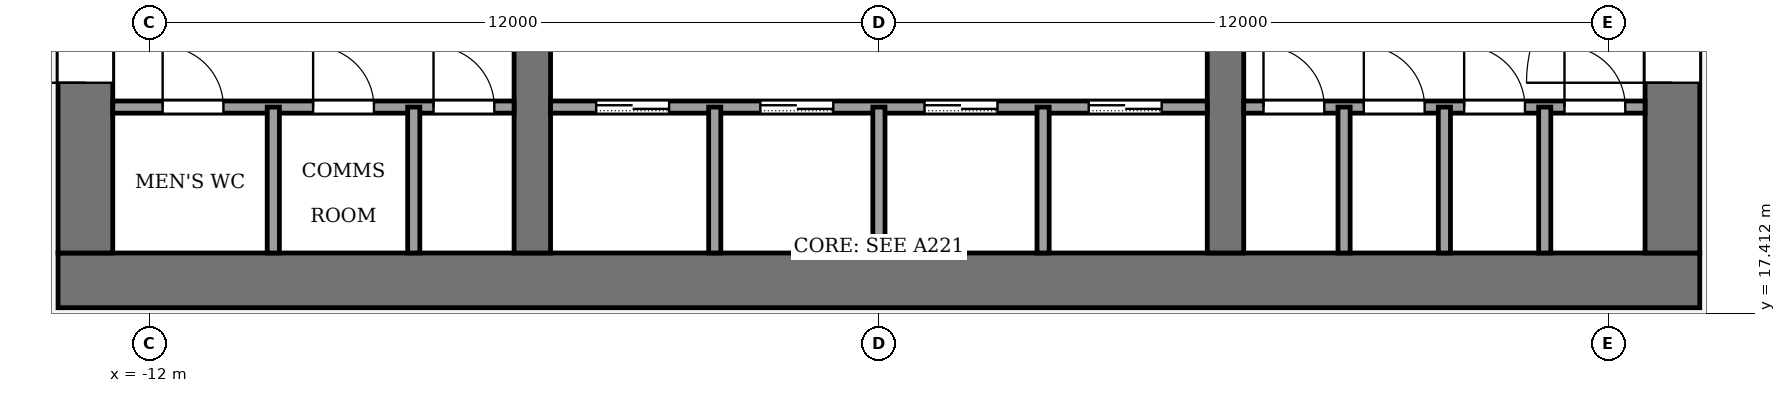
"""IFC4 building model, lengths in metres.
Left out: names, types, materials, properties, quantities, classifications, styles, units other than length and angle.
Written with IfcOpenShell. Run it as: python <this file> out.ifc"""

import sys

from ifc_helpers import new_model, si_unit, direction, frame, frame_2d, origin, place, context, subcontext, project, spatial, rectangle, extrude, element, fill, save


model = new_model("IFC4")
c1 = context("Model", 3, precision=1e-05, world=origin(), true_north=direction((0.0, 1.0)))
c2 = subcontext(c1, "Body", "Model", "MODEL_VIEW")
j1 = project(units=[si_unit("LENGTHUNIT", "METRE"), si_unit("PLANEANGLEUNIT", "RADIAN")], contexts=[c1])
p1 = place(None, origin())
s1 = spatial("IfcSite", under=j1, at=p1, CompositionType="ELEMENT")
p2 = place(p1, origin())
s2 = spatial("IfcBuilding", under=s1, at=p2, CompositionType="ELEMENT")
p3 = place(p2, frame((0.0, 0.0, 198.0)))
s3 = spatial("IfcBuildingStorey", under=s2, at=p3, CompositionType="ELEMENT", Elevation=198.0)
p4 = place(p3, frame((-13.5, 17.95, -0.13), z_axis=(0.0, 0.0, 1.0), x_axis=(1.0, 0.0, 0.0)))
e1 = element("IfcWall", 1, at=p4, inside=s3, PredefinedType="SHEAR", context=c2, shape_type="SweptSolid", body=[
    extrude(rectangle(XDim=27.0, YDim=0.9, at=frame_2d((13.5, 0.0))), origin(), (0.0, 0.0, 1.0), 4.0),
])
p5 = place(p3, frame((-13.05, 18.4, -0.13), z_axis=(0.0, 0.0, 1.0), x_axis=(0.0, 1.0, 0.0)))
e2 = element("IfcWall", 2, at=p5, inside=s3, PredefinedType="SHEAR", context=c2, shape_type="SweptSolid", body=[
    extrude(rectangle(XDim=19.2, YDim=0.9, at=frame_2d((9.6, 0.0))), origin(), (0.0, 0.0, 1.0), 4.0),
])
p6 = place(p5, frame((2.8, 0.0, 0.13)))
e3 = element("IfcOpeningElement", 3, at=p6, cuts=e2, PredefinedType="OPENING", context=c2, shape_type="SweptSolid", body=[
    extrude(rectangle(XDim=2.4, YDim=2.4, at=frame_2d((1.2, 1.2))), frame((0.0, 0.46, 0.0), z_axis=(0.0, -1.0, 0.0), x_axis=(1.0, 0.0, 0.0)), (0.0, 0.0, 1.0), 0.92),
])
p7 = place(p5, frame((13.4, 0.0, 0.13)))
e4 = element("IfcOpeningElement", 4, at=p7, cuts=e2, PredefinedType="OPENING", context=c2, shape_type="SweptSolid", body=[
    extrude(rectangle(XDim=1.4, YDim=2.2, at=frame_2d((0.7, 1.1))), frame((0.0, 0.46, 0.0), z_axis=(0.0, -1.0, 0.0), x_axis=(1.0, 0.0, 0.0)), (0.0, 0.0, 1.0), 0.92),
])
p8 = place(p3, frame((13.05, 18.4, -0.13), z_axis=(0.0, 0.0, 1.0), x_axis=(0.0, 1.0, 0.0)))
e5 = element("IfcWall", 5, at=p8, inside=s3, PredefinedType="SHEAR", context=c2, shape_type="SweptSolid", body=[
    extrude(rectangle(XDim=19.2, YDim=0.9, at=frame_2d((9.6, 0.0))), origin(), (0.0, 0.0, 1.0), 4.0),
])
p9 = place(p8, frame((2.8, 0.0, 0.13)))
e6 = element("IfcOpeningElement", 6, at=p9, cuts=e5, PredefinedType="OPENING", context=c2, shape_type="SweptSolid", body=[
    extrude(rectangle(XDim=2.4, YDim=2.4, at=frame_2d((1.2, 1.2))), frame((0.0, 0.46, 0.0), z_axis=(0.0, -1.0, 0.0), x_axis=(1.0, 0.0, 0.0)), (0.0, 0.0, 1.0), 0.92),
])
p10 = place(p8, frame((13.3, 0.0, 0.13)))
e7 = element("IfcOpeningElement", 7, at=p10, cuts=e5, PredefinedType="OPENING", context=c2, shape_type="SweptSolid", body=[
    extrude(rectangle(XDim=2.4, YDim=2.4, at=frame_2d((1.2, 1.2))), frame((0.0, 0.46, 0.0), z_axis=(0.0, -1.0, 0.0), x_axis=(1.0, 0.0, 0.0)), (0.0, 0.0, 1.0), 0.92),
])
p11 = place(p3, frame((-5.7, 18.4, -0.13), z_axis=(0.0, 0.0, 1.0), x_axis=(0.0, 1.0, 0.0)))
e8 = element("IfcWall", 8, at=p11, inside=s3, PredefinedType="SHEAR", context=c2, shape_type="SweptSolid", body=[
    extrude(rectangle(XDim=19.2, YDim=0.6, at=frame_2d((9.6, 0.0))), origin(), (0.0, 0.0, 1.0), 4.0),
])
p12 = place(p11, frame((8.35, 0.0, 0.13)))
e9 = element("IfcOpeningElement", 9, at=p12, cuts=e8, PredefinedType="OPENING", context=c2, shape_type="SweptSolid", body=[
    extrude(rectangle(XDim=0.9, YDim=2.1, at=frame_2d((0.45, 1.05))), frame((0.0, 0.31, 0.0), z_axis=(0.0, -1.0, 0.0), x_axis=(1.0, 0.0, 0.0)), (0.0, 0.0, 1.0), 0.62),
])
p13 = place(p3, frame((5.7, 18.4, -0.13), z_axis=(0.0, 0.0, 1.0), x_axis=(0.0, 1.0, 0.0)))
e10 = element("IfcWall", 10, at=p13, inside=s3, PredefinedType="SHEAR", context=c2, shape_type="SweptSolid", body=[
    extrude(rectangle(XDim=19.2, YDim=0.6, at=frame_2d((9.6, 0.0))), origin(), (0.0, 0.0, 1.0), 4.0),
])
p14 = place(p13, frame((13.3, 0.0, 0.13)))
e11 = element("IfcOpeningElement", 11, at=p14, cuts=e10, PredefinedType="OPENING", context=c2, shape_type="SweptSolid", body=[
    extrude(rectangle(XDim=2.4, YDim=2.4, at=frame_2d((1.2, 1.2))), frame((0.0, 0.31, 0.0), z_axis=(0.0, -1.0, 0.0), x_axis=(1.0, 0.0, 0.0)), (0.0, 0.0, 1.0), 0.62),
])
p15 = place(p3, frame((-12.6, 20.8, 0.0), z_axis=(0.0, 0.0, 1.0), x_axis=(1.0, 0.0, 0.0)))
e12 = element("IfcWall", 12, at=p15, inside=s3, PredefinedType="PARTITIONING", context=c2, shape_type="SweptSolid", body=[
    extrude(rectangle(XDim=6.6, YDim=0.2, at=frame_2d((3.3, 0.0))), origin(), (0.0, 0.0, 1.0), 3.87),
])
p16 = place(p15, frame((0.82, 0.0, 0.0)))
e13 = element("IfcOpeningElement", 13, at=p16, cuts=e12, PredefinedType="OPENING", context=c2, shape_type="SweptSolid", body=[
    extrude(rectangle(XDim=1.0, YDim=2.1, at=frame_2d((0.5, 1.05))), frame((0.0, 0.11, 0.0), z_axis=(0.0, -1.0, 0.0), x_axis=(1.0, 0.0, 0.0)), (0.0, 0.0, 1.0), 0.22),
])
p17 = place(p15, frame((3.295, 0.0, 0.0)))
e14 = element("IfcOpeningElement", 14, at=p17, cuts=e12, PredefinedType="OPENING", context=c2, shape_type="SweptSolid", body=[
    extrude(rectangle(XDim=1.0, YDim=2.1, at=frame_2d((0.5, 1.05))), frame((0.0, 0.11, 0.0), z_axis=(0.0, -1.0, 0.0), x_axis=(1.0, 0.0, 0.0)), (0.0, 0.0, 1.0), 0.22),
])
p18 = place(p15, frame((5.275, 0.0, 0.0)))
e15 = element("IfcOpeningElement", 15, at=p18, cuts=e12, PredefinedType="OPENING", context=c2, shape_type="SweptSolid", body=[
    extrude(rectangle(XDim=1.0, YDim=2.1, at=frame_2d((0.5, 1.05))), frame((0.0, 0.11, 0.0), z_axis=(0.0, -1.0, 0.0), x_axis=(1.0, 0.0, 0.0)), (0.0, 0.0, 1.0), 0.22),
])
p19 = place(p3, frame((-5.4, 20.8, 0.0), z_axis=(0.0, 0.0, 1.0), x_axis=(1.0, 0.0, 0.0)))
e16 = element("IfcWall", 16, at=p19, inside=s3, PredefinedType="PARTITIONING", context=c2, shape_type="SweptSolid", body=[
    extrude(rectangle(XDim=10.8, YDim=0.2, at=frame_2d((5.4, 0.0))), origin(), (0.0, 0.0, 1.0), 3.87),
])
p20 = place(p19, frame((0.75, 0.0, 0.0)))
e17 = element("IfcOpeningElement", 17, at=p20, cuts=e16, PredefinedType="OPENING", context=c2, shape_type="SweptSolid", body=[
    extrude(rectangle(XDim=1.2, YDim=2.2, at=frame_2d((0.6, 1.1))), frame((0.0, 0.11, 0.0), z_axis=(0.0, -1.0, 0.0), x_axis=(1.0, 0.0, 0.0)), (0.0, 0.0, 1.0), 0.22),
])
p21 = place(p19, frame((3.45, 0.0, 0.0)))
e18 = element("IfcOpeningElement", 18, at=p21, cuts=e16, PredefinedType="OPENING", context=c2, shape_type="SweptSolid", body=[
    extrude(rectangle(XDim=1.2, YDim=2.2, at=frame_2d((0.6, 1.1))), frame((0.0, 0.11, 0.0), z_axis=(0.0, -1.0, 0.0), x_axis=(1.0, 0.0, 0.0)), (0.0, 0.0, 1.0), 0.22),
])
p22 = place(p19, frame((6.15, 0.0, 0.0)))
e19 = element("IfcOpeningElement", 19, at=p22, cuts=e16, PredefinedType="OPENING", context=c2, shape_type="SweptSolid", body=[
    extrude(rectangle(XDim=1.2, YDim=2.2, at=frame_2d((0.6, 1.1))), frame((0.0, 0.11, 0.0), z_axis=(0.0, -1.0, 0.0), x_axis=(1.0, 0.0, 0.0)), (0.0, 0.0, 1.0), 0.22),
])
p23 = place(p19, frame((8.85, 0.0, 0.0)))
e20 = element("IfcOpeningElement", 20, at=p23, cuts=e16, PredefinedType="OPENING", context=c2, shape_type="SweptSolid", body=[
    extrude(rectangle(XDim=1.2, YDim=2.2, at=frame_2d((0.6, 1.1))), frame((0.0, 0.11, 0.0), z_axis=(0.0, -1.0, 0.0), x_axis=(1.0, 0.0, 0.0)), (0.0, 0.0, 1.0), 0.22),
])
p24 = place(p3, frame((6.0, 20.8, 0.0), z_axis=(0.0, 0.0, 1.0), x_axis=(1.0, 0.0, 0.0)))
e21 = element("IfcWall", 21, at=p24, inside=s3, PredefinedType="PARTITIONING", context=c2, shape_type="SweptSolid", body=[
    extrude(rectangle(XDim=6.6, YDim=0.2, at=frame_2d((3.3, 0.0))), origin(), (0.0, 0.0, 1.0), 3.87),
])
p25 = place(p24, frame((0.325, 0.0, 0.0)))
e22 = element("IfcOpeningElement", 22, at=p25, cuts=e21, PredefinedType="OPENING", context=c2, shape_type="SweptSolid", body=[
    extrude(rectangle(XDim=1.0, YDim=2.1, at=frame_2d((0.5, 1.05))), frame((0.0, 0.11, 0.0), z_axis=(0.0, -1.0, 0.0), x_axis=(1.0, 0.0, 0.0)), (0.0, 0.0, 1.0), 0.22),
])
p26 = place(p24, frame((1.975, 0.0, 0.0)))
e23 = element("IfcOpeningElement", 23, at=p26, cuts=e21, PredefinedType="OPENING", context=c2, shape_type="SweptSolid", body=[
    extrude(rectangle(XDim=1.0, YDim=2.1, at=frame_2d((0.5, 1.05))), frame((0.0, 0.11, 0.0), z_axis=(0.0, -1.0, 0.0), x_axis=(1.0, 0.0, 0.0)), (0.0, 0.0, 1.0), 0.22),
])
p27 = place(p24, frame((3.625, 0.0, 0.0)))
e24 = element("IfcOpeningElement", 24, at=p27, cuts=e21, PredefinedType="OPENING", context=c2, shape_type="SweptSolid", body=[
    extrude(rectangle(XDim=1.0, YDim=2.1, at=frame_2d((0.5, 1.05))), frame((0.0, 0.11, 0.0), z_axis=(0.0, -1.0, 0.0), x_axis=(1.0, 0.0, 0.0)), (0.0, 0.0, 1.0), 0.22),
])
p28 = place(p24, frame((5.275, 0.0, 0.0)))
e25 = element("IfcOpeningElement", 25, at=p28, cuts=e21, PredefinedType="OPENING", context=c2, shape_type="SweptSolid", body=[
    extrude(rectangle(XDim=1.0, YDim=2.1, at=frame_2d((0.5, 1.05))), frame((0.0, 0.11, 0.0), z_axis=(0.0, -1.0, 0.0), x_axis=(1.0, 0.0, 0.0)), (0.0, 0.0, 1.0), 0.22),
])
for number, where, z_axis, x_axis in (
    (26, (-9.96, 18.4, 0.0), (0.0, 0.0, 1.0), (0.0, 1.0, 0.0)),
    (27, (-7.65, 18.4, 0.0), (0.0, 0.0, 1.0), (0.0, 1.0, 0.0)),
    (28, (-2.7, 18.4, 0.0), (0.0, 0.0, 1.0), (0.0, 1.0, 0.0)),
    (29, (0.0, 18.4, 0.0), (0.0, 0.0, 1.0), (0.0, 1.0, 0.0)),
    (30, (2.7, 18.4, 0.0), (0.0, 0.0, 1.0), (0.0, 1.0, 0.0)),
    (31, (7.65, 18.4, 0.0), (0.0, 0.0, 1.0), (0.0, 1.0, 0.0)),
    (32, (9.3, 18.4, 0.0), (0.0, 0.0, 1.0), (0.0, 1.0, 0.0)),
    (33, (10.95, 18.4, 0.0), (0.0, 0.0, 1.0), (0.0, 1.0, 0.0)),
):
    element("IfcWall", number, at=place(p3, frame(where, z_axis=z_axis, x_axis=x_axis)), inside=s3, PredefinedType="PARTITIONING", context=c2, shape_type="SweptSolid", body=[
        extrude(rectangle(XDim=2.4, YDim=0.2, at=frame_2d((1.2, 0.0))), origin(), (0.0, 0.0, 1.0), 3.87),
    ])
p29 = place(p20, origin())
e34 = element("IfcDoor", 34, at=p29, inside=s3, OperationType="SLIDING_TO_LEFT", PredefinedType="DOOR", context=c2, shape_type="SweptSolid", body=[
    extrude(rectangle(XDim=1.2, YDim=2.2, at=frame_2d((0.6, 1.1))), frame((0.0, 0.025, 0.0), z_axis=(0.0, -1.0, 0.0), x_axis=(1.0, 0.0, 0.0)), (0.0, 0.0, 1.0), 0.05),
])
fill(e17, e34)
p30 = place(p21, origin())
e35 = element("IfcDoor", 35, at=p30, inside=s3, OperationType="SLIDING_TO_LEFT", PredefinedType="DOOR", context=c2, shape_type="SweptSolid", body=[
    extrude(rectangle(XDim=1.2, YDim=2.2, at=frame_2d((0.6, 1.1))), frame((0.0, 0.025, 0.0), z_axis=(0.0, -1.0, 0.0), x_axis=(1.0, 0.0, 0.0)), (0.0, 0.0, 1.0), 0.05),
])
fill(e18, e35)
p31 = place(p22, origin())
e36 = element("IfcDoor", 36, at=p31, inside=s3, OperationType="SLIDING_TO_LEFT", PredefinedType="DOOR", context=c2, shape_type="SweptSolid", body=[
    extrude(rectangle(XDim=1.2, YDim=2.2, at=frame_2d((0.6, 1.1))), frame((0.0, 0.025, 0.0), z_axis=(0.0, -1.0, 0.0), x_axis=(1.0, 0.0, 0.0)), (0.0, 0.0, 1.0), 0.05),
])
fill(e19, e36)
p32 = place(p23, origin())
e37 = element("IfcDoor", 37, at=p32, inside=s3, OperationType="SLIDING_TO_LEFT", PredefinedType="DOOR", context=c2, shape_type="SweptSolid", body=[
    extrude(rectangle(XDim=1.2, YDim=2.2, at=frame_2d((0.6, 1.1))), frame((0.0, 0.025, 0.0), z_axis=(0.0, -1.0, 0.0), x_axis=(1.0, 0.0, 0.0)), (0.0, 0.0, 1.0), 0.05),
])
fill(e20, e37)
p33 = place(p16, origin())
e38 = element("IfcDoor", 38, at=p33, inside=s3, OperationType="SINGLE_SWING_LEFT", PredefinedType="DOOR", context=c2, shape_type="SweptSolid", body=[
    extrude(rectangle(XDim=1.0, YDim=2.1, at=frame_2d((0.5, 1.05))), frame((0.0, 0.025, 0.0), z_axis=(0.0, -1.0, 0.0), x_axis=(1.0, 0.0, 0.0)), (0.0, 0.0, 1.0), 0.05),
])
fill(e13, e38)
p34 = place(p17, origin())
e39 = element("IfcDoor", 39, at=p34, inside=s3, OperationType="SINGLE_SWING_LEFT", PredefinedType="DOOR", context=c2, shape_type="SweptSolid", body=[
    extrude(rectangle(XDim=1.0, YDim=2.1, at=frame_2d((0.5, 1.05))), frame((0.0, 0.025, 0.0), z_axis=(0.0, -1.0, 0.0), x_axis=(1.0, 0.0, 0.0)), (0.0, 0.0, 1.0), 0.05),
])
fill(e14, e39)
p35 = place(p18, origin())
e40 = element("IfcDoor", 40, at=p35, inside=s3, OperationType="SINGLE_SWING_RIGHT", PredefinedType="DOOR", context=c2, shape_type="SweptSolid", body=[
    extrude(rectangle(XDim=1.0, YDim=2.1, at=frame_2d((0.5, 1.05))), frame((0.0, 0.025, 0.0), z_axis=(0.0, -1.0, 0.0), x_axis=(1.0, 0.0, 0.0)), (0.0, 0.0, 1.0), 0.05),
])
fill(e15, e40)
p36 = place(p25, origin())
e41 = element("IfcDoor", 41, at=p36, inside=s3, OperationType="SINGLE_SWING_LEFT", PredefinedType="DOOR", context=c2, shape_type="SweptSolid", body=[
    extrude(rectangle(XDim=1.0, YDim=2.1, at=frame_2d((0.5, 1.05))), frame((0.0, 0.025, 0.0), z_axis=(0.0, -1.0, 0.0), x_axis=(1.0, 0.0, 0.0)), (0.0, 0.0, 1.0), 0.05),
])
fill(e22, e41)
p37 = place(p26, origin())
e42 = element("IfcDoor", 42, at=p37, inside=s3, OperationType="SINGLE_SWING_LEFT", PredefinedType="DOOR", context=c2, shape_type="SweptSolid", body=[
    extrude(rectangle(XDim=1.0, YDim=2.1, at=frame_2d((0.5, 1.05))), frame((0.0, 0.025, 0.0), z_axis=(0.0, -1.0, 0.0), x_axis=(1.0, 0.0, 0.0)), (0.0, 0.0, 1.0), 0.05),
])
fill(e23, e42)
p38 = place(p27, origin())
e43 = element("IfcDoor", 43, at=p38, inside=s3, OperationType="SINGLE_SWING_RIGHT", PredefinedType="DOOR", context=c2, shape_type="SweptSolid", body=[
    extrude(rectangle(XDim=1.0, YDim=2.1, at=frame_2d((0.5, 1.05))), frame((0.0, 0.025, 0.0), z_axis=(0.0, -1.0, 0.0), x_axis=(1.0, 0.0, 0.0)), (0.0, 0.0, 1.0), 0.05),
])
fill(e24, e43)
p39 = place(p28, origin())
e44 = element("IfcDoor", 44, at=p39, inside=s3, OperationType="SINGLE_SWING_RIGHT", PredefinedType="DOOR", context=c2, shape_type="SweptSolid", body=[
    extrude(rectangle(XDim=1.0, YDim=2.1, at=frame_2d((0.5, 1.05))), frame((0.0, 0.025, 0.0), z_axis=(0.0, -1.0, 0.0), x_axis=(1.0, 0.0, 0.0)), (0.0, 0.0, 1.0), 0.05),
])
fill(e25, e44)
p40 = place(p6, origin())
e45 = element("IfcDoor", 45, at=p40, inside=s3, OperationType="DOUBLE_DOOR_SINGLE_SWING", PredefinedType="DOOR", context=c2, shape_type="SweptSolid", body=[
    extrude(rectangle(XDim=2.4, YDim=2.4, at=frame_2d((1.2, 1.2))), frame((0.0, 0.025, 0.0), z_axis=(0.0, -1.0, 0.0), x_axis=(1.0, 0.0, 0.0)), (0.0, 0.0, 1.0), 0.05),
])
fill(e3, e45)
p41 = place(p9, origin())
e46 = element("IfcDoor", 46, at=p41, inside=s3, OperationType="DOUBLE_DOOR_SINGLE_SWING", PredefinedType="DOOR", context=c2, shape_type="SweptSolid", body=[
    extrude(rectangle(XDim=2.4, YDim=2.4, at=frame_2d((1.2, 1.2))), frame((0.0, 0.025, 0.0), z_axis=(0.0, -1.0, 0.0), x_axis=(1.0, 0.0, 0.0)), (0.0, 0.0, 1.0), 0.05),
])
fill(e6, e46)
save(model, sys.argv[1])
